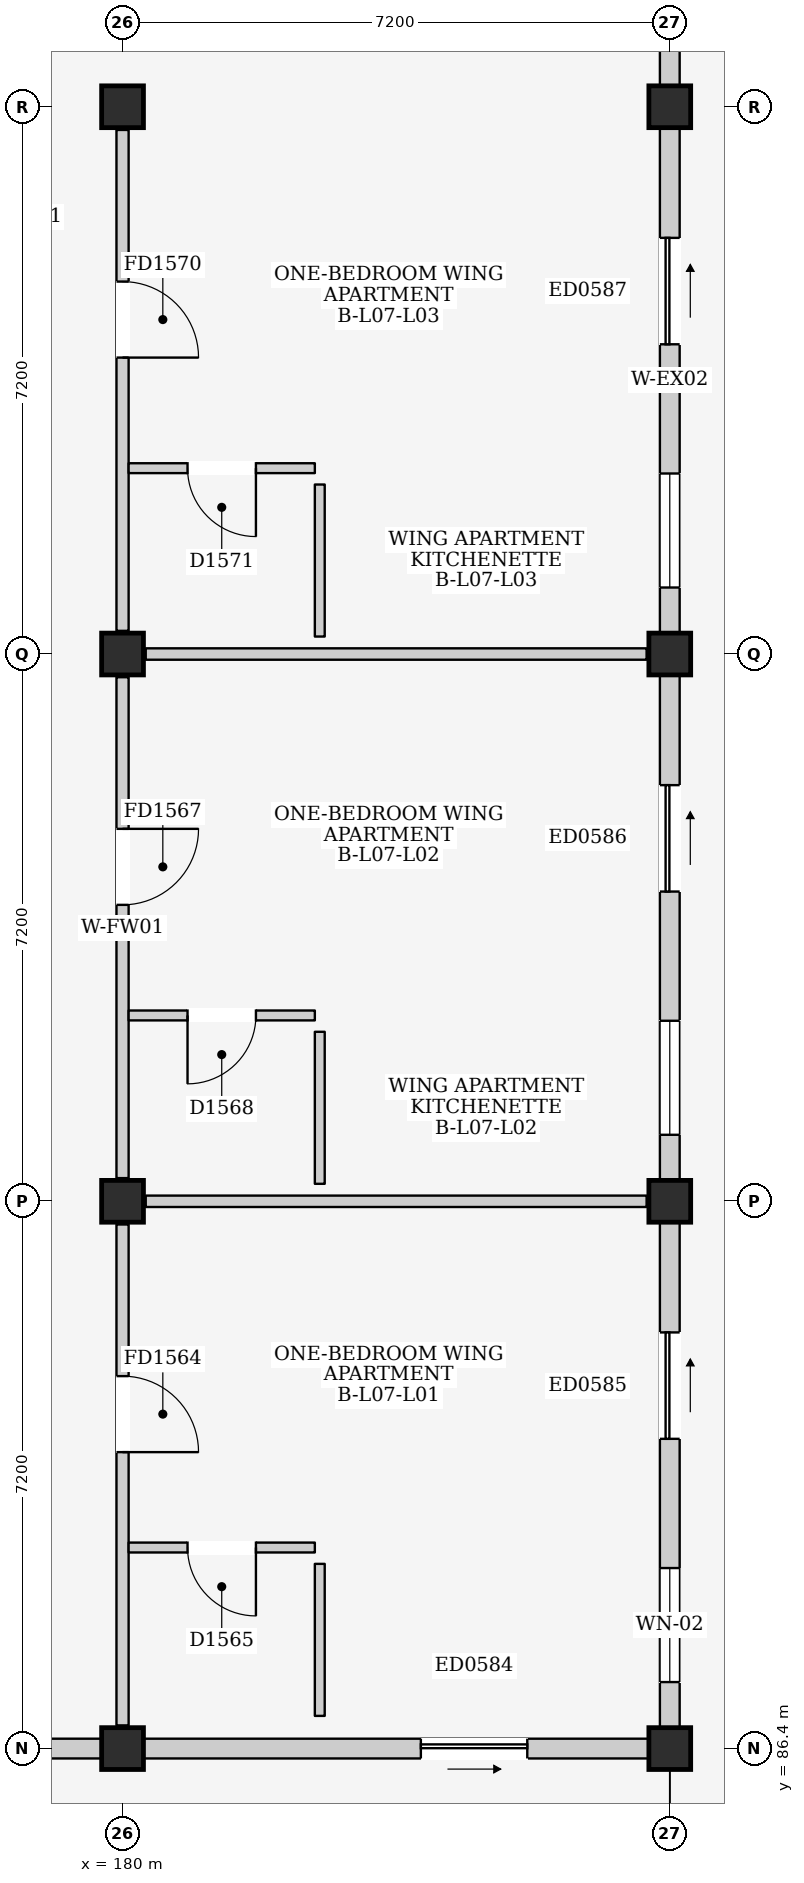
"""IFC4 building model, lengths in metres.
Left out: names, types, materials, properties, quantities, classifications, styles, units other than length and angle.
Written with IfcOpenShell. Run it as: python <this file> out.ifc"""

import sys

from ifc_helpers import new_model, si_unit, direction, frame, frame_2d, origin, origin_2d, place, context, subcontext, project, spatial, rectangle, extrude, element, fill, save


model = new_model("IFC4")
c1 = context("Model", 3, precision=1e-05, world=origin(), true_north=direction((0.0, 1.0)))
c2 = subcontext(c1, "Body", "Model", "MODEL_VIEW")
j1 = project(units=[si_unit("LENGTHUNIT", "METRE"), si_unit("PLANEANGLEUNIT", "RADIAN")], contexts=[c1])
p1 = place(None, origin())
s1 = spatial("IfcSite", under=j1, at=p1, CompositionType="ELEMENT")
p2 = place(p1, origin())
s2 = spatial("IfcBuilding", under=s1, at=p2, CompositionType="ELEMENT")
p3 = place(p2, frame((0.0, 0.0, 25.1)))
s3 = spatial("IfcBuildingStorey", under=s2, at=p3, CompositionType="ELEMENT", Elevation=25.1)
for number, where, z_axis, x_axis in (
    (1, (180.0, 86.4, 0.0), (0.0, 0.0, 1.0), (1.0, 0.0, 0.0)),
    (2, (180.0, 93.6, 0.0), (0.0, 0.0, 1.0), (1.0, 0.0, 0.0)),
    (3, (180.0, 100.8, 0.0), (0.0, 0.0, 1.0), (1.0, 0.0, 0.0)),
    (4, (180.0, 108.0, 0.0), (0.0, 0.0, 1.0), (1.0, 0.0, 0.0)),
    (5, (187.2, 86.4, 0.0), (0.0, 0.0, 1.0), (1.0, 0.0, 0.0)),
    (6, (187.2, 93.6, 0.0), (0.0, 0.0, 1.0), (1.0, 0.0, 0.0)),
    (7, (187.2, 100.8, 0.0), (0.0, 0.0, 1.0), (1.0, 0.0, 0.0)),
    (8, (187.2, 108.0, 0.0), (0.0, 0.0, 1.0), (1.0, 0.0, 0.0)),
):
    element("IfcColumn", number, at=place(p3, frame(where, z_axis=z_axis, x_axis=x_axis)), inside=s3, PredefinedType="COLUMN", context=c2, shape_type="SweptSolid", body=[
        extrude(rectangle(XDim=0.55, YDim=0.55, at=origin_2d()), origin(), (0.0, 0.0, 1.0), 3.2),
    ])
p4 = place(p3, frame((173.075, 86.4, 0.0), z_axis=(0.0, 0.0, 1.0), x_axis=(1.0, 0.0, 0.0)))
e9 = element("IfcWall", 9, at=p4, inside=s3, PredefinedType="ELEMENTEDWALL", context=c2, shape_type="SweptSolid", body=[
    extrude(rectangle(XDim=6.65, YDim=0.26, at=frame_2d((3.325, 0.0))), origin(), (0.0, 0.0, 1.0), 2.375),
])
p5 = place(p4, frame((2.825, 0.0, 1.1)))
e10 = element("IfcOpeningElement", 10, at=p5, cuts=e9, PredefinedType="OPENING", context=c2, shape_type="SweptSolid", body=[
    extrude(rectangle(XDim=1.0, YDim=0.9, at=frame_2d((0.5, 0.45))), frame((0.0, 0.145, 0.0), z_axis=(0.0, -1.0, 0.0), x_axis=(1.0, 0.0, 0.0)), (0.0, 0.0, 1.0), 0.29),
])
p6 = place(p3, frame((180.275, 86.4, 0.0), z_axis=(0.0, 0.0, 1.0), x_axis=(1.0, 0.0, 0.0)))
e11 = element("IfcWall", 11, at=p6, inside=s3, PredefinedType="ELEMENTEDWALL", context=c2, shape_type="SweptSolid", body=[
    extrude(rectangle(XDim=6.65, YDim=0.26, at=frame_2d((3.325, 0.0))), origin(), (0.0, 0.0, 1.0), 2.375),
])
p7 = place(p6, frame((3.65, 0.0, 0.0)))
e12 = element("IfcOpeningElement", 12, at=p7, cuts=e11, PredefinedType="OPENING", context=c2, shape_type="SweptSolid", body=[
    extrude(rectangle(XDim=1.4, YDim=2.1, at=frame_2d((0.7, 1.05))), frame((0.0, 0.145, 0.0), z_axis=(0.0, -1.0, 0.0), x_axis=(1.0, 0.0, 0.0)), (0.0, 0.0, 1.0), 0.29),
])
p8 = place(p3, frame((187.2, 86.675, 0.0), z_axis=(0.0, 0.0, 1.0), x_axis=(0.0, 1.0, 0.0)))
e13 = element("IfcWall", 13, at=p8, inside=s3, PredefinedType="ELEMENTEDWALL", context=c2, shape_type="SweptSolid", body=[
    extrude(rectangle(XDim=6.65, YDim=0.26, at=frame_2d((3.325, 0.0))), origin(), (0.0, 0.0, 1.0), 2.525),
])
p9 = place(p8, frame((3.8, 0.0, 0.0)))
e14 = element("IfcOpeningElement", 14, at=p9, cuts=e13, PredefinedType="OPENING", context=c2, shape_type="SweptSolid", body=[
    extrude(rectangle(XDim=1.4, YDim=2.1, at=frame_2d((0.7, 1.05))), frame((0.0, 0.145, 0.0), z_axis=(0.0, -1.0, 0.0), x_axis=(1.0, 0.0, 0.0)), (0.0, 0.0, 1.0), 0.29),
])
p10 = place(p8, frame((0.6, 0.0, 0.915)))
e15 = element("IfcOpeningElement", 15, at=p10, cuts=e13, PredefinedType="OPENING", context=c2, shape_type="SweptSolid", body=[
    extrude(rectangle(XDim=1.5, YDim=1.5, at=frame_2d((0.75, 0.75))), frame((0.0, 0.145, 0.0), z_axis=(0.0, -1.0, 0.0), x_axis=(1.0, 0.0, 0.0)), (0.0, 0.0, 1.0), 0.29),
])
p11 = place(p3, frame((187.2, 93.875, 0.0), z_axis=(0.0, 0.0, 1.0), x_axis=(0.0, 1.0, 0.0)))
e16 = element("IfcWall", 16, at=p11, inside=s3, PredefinedType="ELEMENTEDWALL", context=c2, shape_type="SweptSolid", body=[
    extrude(rectangle(XDim=6.65, YDim=0.26, at=frame_2d((3.325, 0.0))), origin(), (0.0, 0.0, 1.0), 2.525),
])
p12 = place(p11, frame((3.8, 0.0, 0.0)))
e17 = element("IfcOpeningElement", 17, at=p12, cuts=e16, PredefinedType="OPENING", context=c2, shape_type="SweptSolid", body=[
    extrude(rectangle(XDim=1.4, YDim=2.1, at=frame_2d((0.7, 1.05))), frame((0.0, 0.145, 0.0), z_axis=(0.0, -1.0, 0.0), x_axis=(1.0, 0.0, 0.0)), (0.0, 0.0, 1.0), 0.29),
])
p13 = place(p11, frame((0.6, 0.0, 0.915)))
e18 = element("IfcOpeningElement", 18, at=p13, cuts=e16, PredefinedType="OPENING", context=c2, shape_type="SweptSolid", body=[
    extrude(rectangle(XDim=1.5, YDim=1.5, at=frame_2d((0.75, 0.75))), frame((0.0, 0.145, 0.0), z_axis=(0.0, -1.0, 0.0), x_axis=(1.0, 0.0, 0.0)), (0.0, 0.0, 1.0), 0.29),
])
p14 = place(p3, frame((187.2, 101.075, 0.0), z_axis=(0.0, 0.0, 1.0), x_axis=(0.0, 1.0, 0.0)))
e19 = element("IfcWall", 19, at=p14, inside=s3, PredefinedType="ELEMENTEDWALL", context=c2, shape_type="SweptSolid", body=[
    extrude(rectangle(XDim=6.65, YDim=0.26, at=frame_2d((3.325, 0.0))), origin(), (0.0, 0.0, 1.0), 2.525),
])
p15 = place(p14, frame((3.8, 0.0, 0.0)))
e20 = element("IfcOpeningElement", 20, at=p15, cuts=e19, PredefinedType="OPENING", context=c2, shape_type="SweptSolid", body=[
    extrude(rectangle(XDim=1.4, YDim=2.1, at=frame_2d((0.7, 1.05))), frame((0.0, 0.145, 0.0), z_axis=(0.0, -1.0, 0.0), x_axis=(1.0, 0.0, 0.0)), (0.0, 0.0, 1.0), 0.29),
])
p16 = place(p14, frame((0.6, 0.0, 0.915)))
e21 = element("IfcOpeningElement", 21, at=p16, cuts=e19, PredefinedType="OPENING", context=c2, shape_type="SweptSolid", body=[
    extrude(rectangle(XDim=1.5, YDim=1.5, at=frame_2d((0.75, 0.75))), frame((0.0, 0.145, 0.0), z_axis=(0.0, -1.0, 0.0), x_axis=(1.0, 0.0, 0.0)), (0.0, 0.0, 1.0), 0.29),
])
p17 = place(p3, frame((187.2, 108.275, 0.0), z_axis=(0.0, 0.0, 1.0), x_axis=(0.0, 1.0, 0.0)))
e22 = element("IfcWall", 22, at=p17, inside=s3, PredefinedType="ELEMENTEDWALL", context=c2, shape_type="SweptSolid", body=[
    extrude(rectangle(XDim=6.65, YDim=0.26, at=frame_2d((3.325, 0.0))), origin(), (0.0, 0.0, 1.0), 2.525),
])
p18 = place(p17, frame((3.65, 0.0, 0.0)))
e23 = element("IfcOpeningElement", 23, at=p18, cuts=e22, PredefinedType="OPENING", context=c2, shape_type="SweptSolid", body=[
    extrude(rectangle(XDim=1.4, YDim=2.1, at=frame_2d((0.7, 1.05))), frame((0.0, 0.145, 0.0), z_axis=(0.0, -1.0, 0.0), x_axis=(1.0, 0.0, 0.0)), (0.0, 0.0, 1.0), 0.29),
])
p19 = place(p3, frame((180.0, 86.705, 0.0), z_axis=(0.0, 0.0, 1.0), x_axis=(0.0, 1.0, 0.0)))
e24 = element("IfcWall", 24, at=p19, inside=s3, PredefinedType="PARTITIONING", context=c2, shape_type="SweptSolid", body=[
    extrude(rectangle(XDim=6.59, YDim=0.16, at=frame_2d((3.295, 0.0))), origin(), (0.0, 0.0, 1.0), 2.475),
])
p20 = place(p19, frame((3.595, 0.0, 0.0)))
e25 = element("IfcOpeningElement", 25, at=p20, cuts=e24, PredefinedType="OPENING", context=c2, shape_type="SweptSolid", body=[
    extrude(rectangle(XDim=1.0, YDim=2.15, at=frame_2d((0.5, 1.075))), frame((0.0, 0.095, 0.0), z_axis=(0.0, -1.0, 0.0), x_axis=(1.0, 0.0, 0.0)), (0.0, 0.0, 1.0), 0.19),
])
p21 = place(p3, frame((180.305, 93.6, 0.0), z_axis=(0.0, 0.0, 1.0), x_axis=(1.0, 0.0, 0.0)))
e26 = element("IfcWall", 26, at=p21, inside=s3, PredefinedType="PARTITIONING", context=c2, shape_type="SweptSolid", body=[
    extrude(rectangle(XDim=6.59, YDim=0.15, at=frame_2d((3.295, 0.0))), origin(), (0.0, 0.0, 1.0), 2.375),
])
p22 = place(p3, frame((180.08, 89.045, 0.0), z_axis=(0.0, 0.0, 1.0), x_axis=(1.0, 0.0, 0.0)))
e27 = element("IfcWall", 27, at=p22, inside=s3, PredefinedType="PARTITIONING", context=c2, shape_type="SweptSolid", body=[
    extrude(rectangle(XDim=2.45, YDim=0.13, at=frame_2d((1.225, 0.0))), origin(), (0.0, 0.0, 1.0), 2.99),
])
p23 = place(p22, frame((0.775, 0.0, 0.0)))
e28 = element("IfcOpeningElement", 28, at=p23, cuts=e27, PredefinedType="OPENING", context=c2, shape_type="SweptSolid", body=[
    extrude(rectangle(XDim=0.9, YDim=2.1, at=frame_2d((0.45, 1.05))), frame((0.0, 0.08, 0.0), z_axis=(0.0, -1.0, 0.0), x_axis=(1.0, 0.0, 0.0)), (0.0, 0.0, 1.0), 0.16),
])
p24 = place(p3, frame((182.595, 86.83, 0.0), z_axis=(0.0, 0.0, 1.0), x_axis=(0.0, 1.0, 0.0)))
e29 = element("IfcWall", 29, at=p24, inside=s3, PredefinedType="PARTITIONING", context=c2, shape_type="SweptSolid", body=[
    extrude(rectangle(XDim=2.0, YDim=0.13, at=frame_2d((1.0, 0.0))), origin(), (0.0, 0.0, 1.0), 2.99),
])
p25 = place(p3, frame((180.0, 93.905, 0.0), z_axis=(0.0, 0.0, 1.0), x_axis=(0.0, 1.0, 0.0)))
e30 = element("IfcWall", 30, at=p25, inside=s3, PredefinedType="PARTITIONING", context=c2, shape_type="SweptSolid", body=[
    extrude(rectangle(XDim=6.59, YDim=0.16, at=frame_2d((3.295, 0.0))), origin(), (0.0, 0.0, 1.0), 2.475),
])
p26 = place(p25, frame((3.595, 0.0, 0.0)))
e31 = element("IfcOpeningElement", 31, at=p26, cuts=e30, PredefinedType="OPENING", context=c2, shape_type="SweptSolid", body=[
    extrude(rectangle(XDim=1.0, YDim=2.15, at=frame_2d((0.5, 1.075))), frame((0.0, 0.095, 0.0), z_axis=(0.0, -1.0, 0.0), x_axis=(1.0, 0.0, 0.0)), (0.0, 0.0, 1.0), 0.19),
])
p27 = place(p3, frame((180.305, 100.8, 0.0), z_axis=(0.0, 0.0, 1.0), x_axis=(1.0, 0.0, 0.0)))
e32 = element("IfcWall", 32, at=p27, inside=s3, PredefinedType="PARTITIONING", context=c2, shape_type="SweptSolid", body=[
    extrude(rectangle(XDim=6.59, YDim=0.15, at=frame_2d((3.295, 0.0))), origin(), (0.0, 0.0, 1.0), 2.375),
])
p28 = place(p3, frame((180.08, 96.045, 0.0), z_axis=(0.0, 0.0, 1.0), x_axis=(1.0, 0.0, 0.0)))
e33 = element("IfcWall", 33, at=p28, inside=s3, PredefinedType="PARTITIONING", context=c2, shape_type="SweptSolid", body=[
    extrude(rectangle(XDim=2.45, YDim=0.13, at=frame_2d((1.225, 0.0))), origin(), (0.0, 0.0, 1.0), 2.99),
])
p29 = place(p28, frame((0.775, 0.0, 0.0)))
e34 = element("IfcOpeningElement", 34, at=p29, cuts=e33, PredefinedType="OPENING", context=c2, shape_type="SweptSolid", body=[
    extrude(rectangle(XDim=0.9, YDim=2.1, at=frame_2d((0.45, 1.05))), frame((0.0, 0.08, 0.0), z_axis=(0.0, -1.0, 0.0), x_axis=(1.0, 0.0, 0.0)), (0.0, 0.0, 1.0), 0.16),
])
p30 = place(p3, frame((182.595, 93.83, 0.0), z_axis=(0.0, 0.0, 1.0), x_axis=(0.0, 1.0, 0.0)))
e35 = element("IfcWall", 35, at=p30, inside=s3, PredefinedType="PARTITIONING", context=c2, shape_type="SweptSolid", body=[
    extrude(rectangle(XDim=2.0, YDim=0.13, at=frame_2d((1.0, 0.0))), origin(), (0.0, 0.0, 1.0), 2.99),
])
p31 = place(p3, frame((180.0, 101.105, 0.0), z_axis=(0.0, 0.0, 1.0), x_axis=(0.0, 1.0, 0.0)))
e36 = element("IfcWall", 36, at=p31, inside=s3, PredefinedType="PARTITIONING", context=c2, shape_type="SweptSolid", body=[
    extrude(rectangle(XDim=6.59, YDim=0.16, at=frame_2d((3.295, 0.0))), origin(), (0.0, 0.0, 1.0), 2.475),
])
p32 = place(p31, frame((3.595, 0.0, 0.0)))
e37 = element("IfcOpeningElement", 37, at=p32, cuts=e36, PredefinedType="OPENING", context=c2, shape_type="SweptSolid", body=[
    extrude(rectangle(XDim=1.0, YDim=2.15, at=frame_2d((0.5, 1.075))), frame((0.0, 0.095, 0.0), z_axis=(0.0, -1.0, 0.0), x_axis=(1.0, 0.0, 0.0)), (0.0, 0.0, 1.0), 0.19),
])
p33 = place(p3, frame((180.08, 103.245, 0.0), z_axis=(0.0, 0.0, 1.0), x_axis=(1.0, 0.0, 0.0)))
e38 = element("IfcWall", 38, at=p33, inside=s3, PredefinedType="PARTITIONING", context=c2, shape_type="SweptSolid", body=[
    extrude(rectangle(XDim=2.45, YDim=0.13, at=frame_2d((1.225, 0.0))), origin(), (0.0, 0.0, 1.0), 2.99),
])
p34 = place(p33, frame((0.775, 0.0, 0.0)))
e39 = element("IfcOpeningElement", 39, at=p34, cuts=e38, PredefinedType="OPENING", context=c2, shape_type="SweptSolid", body=[
    extrude(rectangle(XDim=0.9, YDim=2.1, at=frame_2d((0.45, 1.05))), frame((0.0, 0.08, 0.0), z_axis=(0.0, -1.0, 0.0), x_axis=(1.0, 0.0, 0.0)), (0.0, 0.0, 1.0), 0.16),
])
p35 = place(p3, frame((182.595, 101.03, 0.0), z_axis=(0.0, 0.0, 1.0), x_axis=(0.0, 1.0, 0.0)))
e40 = element("IfcWall", 40, at=p35, inside=s3, PredefinedType="PARTITIONING", context=c2, shape_type="SweptSolid", body=[
    extrude(rectangle(XDim=2.0, YDim=0.13, at=frame_2d((1.0, 0.0))), origin(), (0.0, 0.0, 1.0), 2.99),
])
p36 = place(p7, frame((1.4, 0.0, 0.0), z_axis=(0.0, 0.0, 1.0), x_axis=(-1.0, 0.0, 0.0)))
e41 = element("IfcDoor", 41, at=p36, inside=s3, OperationType="SLIDING_TO_RIGHT", PredefinedType="DOOR", context=c2, shape_type="SweptSolid", body=[
    extrude(rectangle(XDim=1.4, YDim=2.1, at=frame_2d((0.7, 1.05))), frame((0.0, 0.025, 0.0), z_axis=(0.0, -1.0, 0.0), x_axis=(1.0, 0.0, 0.0)), (0.0, 0.0, 1.0), 0.05),
])
fill(e12, e41)
p37 = place(p9, frame((1.4, 0.0, 0.0), z_axis=(0.0, 0.0, 1.0), x_axis=(-1.0, 0.0, 0.0)))
e42 = element("IfcDoor", 42, at=p37, inside=s3, OperationType="SLIDING_TO_RIGHT", PredefinedType="DOOR", context=c2, shape_type="SweptSolid", body=[
    extrude(rectangle(XDim=1.4, YDim=2.1, at=frame_2d((0.7, 1.05))), frame((0.0, 0.025, 0.0), z_axis=(0.0, -1.0, 0.0), x_axis=(1.0, 0.0, 0.0)), (0.0, 0.0, 1.0), 0.05),
])
fill(e14, e42)
p38 = place(p10, origin())
e43 = element("IfcWindow", 43, at=p38, inside=s3, PartitioningType="DOUBLE_PANEL_VERTICAL", PredefinedType="WINDOW", context=c2, shape_type="SweptSolid", body=[
    extrude(rectangle(XDim=1.5, YDim=1.5, at=frame_2d((0.75, 0.75))), frame((0.0, 0.03, 0.0), z_axis=(0.0, -1.0, 0.0), x_axis=(1.0, 0.0, 0.0)), (0.0, 0.0, 1.0), 0.06),
])
fill(e15, e43)
p39 = place(p12, frame((1.4, 0.0, 0.0), z_axis=(0.0, 0.0, 1.0), x_axis=(-1.0, 0.0, 0.0)))
e44 = element("IfcDoor", 44, at=p39, inside=s3, OperationType="SLIDING_TO_RIGHT", PredefinedType="DOOR", context=c2, shape_type="SweptSolid", body=[
    extrude(rectangle(XDim=1.4, YDim=2.1, at=frame_2d((0.7, 1.05))), frame((0.0, 0.025, 0.0), z_axis=(0.0, -1.0, 0.0), x_axis=(1.0, 0.0, 0.0)), (0.0, 0.0, 1.0), 0.05),
])
fill(e17, e44)
p40 = place(p13, origin())
e45 = element("IfcWindow", 45, at=p40, inside=s3, PartitioningType="DOUBLE_PANEL_VERTICAL", PredefinedType="WINDOW", context=c2, shape_type="SweptSolid", body=[
    extrude(rectangle(XDim=1.5, YDim=1.5, at=frame_2d((0.75, 0.75))), frame((0.0, 0.03, 0.0), z_axis=(0.0, -1.0, 0.0), x_axis=(1.0, 0.0, 0.0)), (0.0, 0.0, 1.0), 0.06),
])
fill(e18, e45)
p41 = place(p15, frame((1.4, 0.0, 0.0), z_axis=(0.0, 0.0, 1.0), x_axis=(-1.0, 0.0, 0.0)))
e46 = element("IfcDoor", 46, at=p41, inside=s3, OperationType="SLIDING_TO_RIGHT", PredefinedType="DOOR", context=c2, shape_type="SweptSolid", body=[
    extrude(rectangle(XDim=1.4, YDim=2.1, at=frame_2d((0.7, 1.05))), frame((0.0, 0.025, 0.0), z_axis=(0.0, -1.0, 0.0), x_axis=(1.0, 0.0, 0.0)), (0.0, 0.0, 1.0), 0.05),
])
fill(e20, e46)
p42 = place(p16, origin())
e47 = element("IfcWindow", 47, at=p42, inside=s3, PartitioningType="DOUBLE_PANEL_VERTICAL", PredefinedType="WINDOW", context=c2, shape_type="SweptSolid", body=[
    extrude(rectangle(XDim=1.5, YDim=1.5, at=frame_2d((0.75, 0.75))), frame((0.0, 0.03, 0.0), z_axis=(0.0, -1.0, 0.0), x_axis=(1.0, 0.0, 0.0)), (0.0, 0.0, 1.0), 0.06),
])
fill(e21, e47)
p43 = place(p20, frame((1.0, 0.0, 0.0), z_axis=(0.0, 0.0, 1.0), x_axis=(-1.0, 0.0, 0.0)))
e48 = element("IfcDoor", 48, at=p43, inside=s3, OperationType="SINGLE_SWING_RIGHT", PredefinedType="DOOR", context=c2, shape_type="SweptSolid", body=[
    extrude(rectangle(XDim=1.0, YDim=2.15, at=frame_2d((0.5, 1.075))), frame((0.0, 0.025, 0.0), z_axis=(0.0, -1.0, 0.0), x_axis=(1.0, 0.0, 0.0)), (0.0, 0.0, 1.0), 0.05),
])
fill(e25, e48)
p44 = place(p23, frame((0.9, 0.0, 0.0), z_axis=(0.0, 0.0, 1.0), x_axis=(-1.0, 0.0, 0.0)))
e49 = element("IfcDoor", 49, at=p44, inside=s3, OperationType="SINGLE_SWING_LEFT", PredefinedType="DOOR", context=c2, shape_type="SweptSolid", body=[
    extrude(rectangle(XDim=0.9, YDim=2.1, at=frame_2d((0.45, 1.05))), frame((0.0, 0.025, 0.0), z_axis=(0.0, -1.0, 0.0), x_axis=(1.0, 0.0, 0.0)), (0.0, 0.0, 1.0), 0.05),
])
fill(e28, e49)
p45 = place(p26, frame((1.0, 0.0, 0.0), z_axis=(0.0, 0.0, 1.0), x_axis=(-1.0, 0.0, 0.0)))
e50 = element("IfcDoor", 50, at=p45, inside=s3, OperationType="SINGLE_SWING_LEFT", PredefinedType="DOOR", context=c2, shape_type="SweptSolid", body=[
    extrude(rectangle(XDim=1.0, YDim=2.15, at=frame_2d((0.5, 1.075))), frame((0.0, 0.025, 0.0), z_axis=(0.0, -1.0, 0.0), x_axis=(1.0, 0.0, 0.0)), (0.0, 0.0, 1.0), 0.05),
])
fill(e31, e50)
p46 = place(p29, frame((0.9, 0.0, 0.0), z_axis=(0.0, 0.0, 1.0), x_axis=(-1.0, 0.0, 0.0)))
e51 = element("IfcDoor", 51, at=p46, inside=s3, OperationType="SINGLE_SWING_RIGHT", PredefinedType="DOOR", context=c2, shape_type="SweptSolid", body=[
    extrude(rectangle(XDim=0.9, YDim=2.1, at=frame_2d((0.45, 1.05))), frame((0.0, 0.025, 0.0), z_axis=(0.0, -1.0, 0.0), x_axis=(1.0, 0.0, 0.0)), (0.0, 0.0, 1.0), 0.05),
])
fill(e34, e51)
p47 = place(p32, frame((1.0, 0.0, 0.0), z_axis=(0.0, 0.0, 1.0), x_axis=(-1.0, 0.0, 0.0)))
e52 = element("IfcDoor", 52, at=p47, inside=s3, OperationType="SINGLE_SWING_RIGHT", PredefinedType="DOOR", context=c2, shape_type="SweptSolid", body=[
    extrude(rectangle(XDim=1.0, YDim=2.15, at=frame_2d((0.5, 1.075))), frame((0.0, 0.025, 0.0), z_axis=(0.0, -1.0, 0.0), x_axis=(1.0, 0.0, 0.0)), (0.0, 0.0, 1.0), 0.05),
])
fill(e37, e52)
p48 = place(p34, frame((0.9, 0.0, 0.0), z_axis=(0.0, 0.0, 1.0), x_axis=(-1.0, 0.0, 0.0)))
e53 = element("IfcDoor", 53, at=p48, inside=s3, OperationType="SINGLE_SWING_LEFT", PredefinedType="DOOR", context=c2, shape_type="SweptSolid", body=[
    extrude(rectangle(XDim=0.9, YDim=2.1, at=frame_2d((0.45, 1.05))), frame((0.0, 0.025, 0.0), z_axis=(0.0, -1.0, 0.0), x_axis=(1.0, 0.0, 0.0)), (0.0, 0.0, 1.0), 0.05),
])
fill(e39, e53)
save(model, sys.argv[1])
